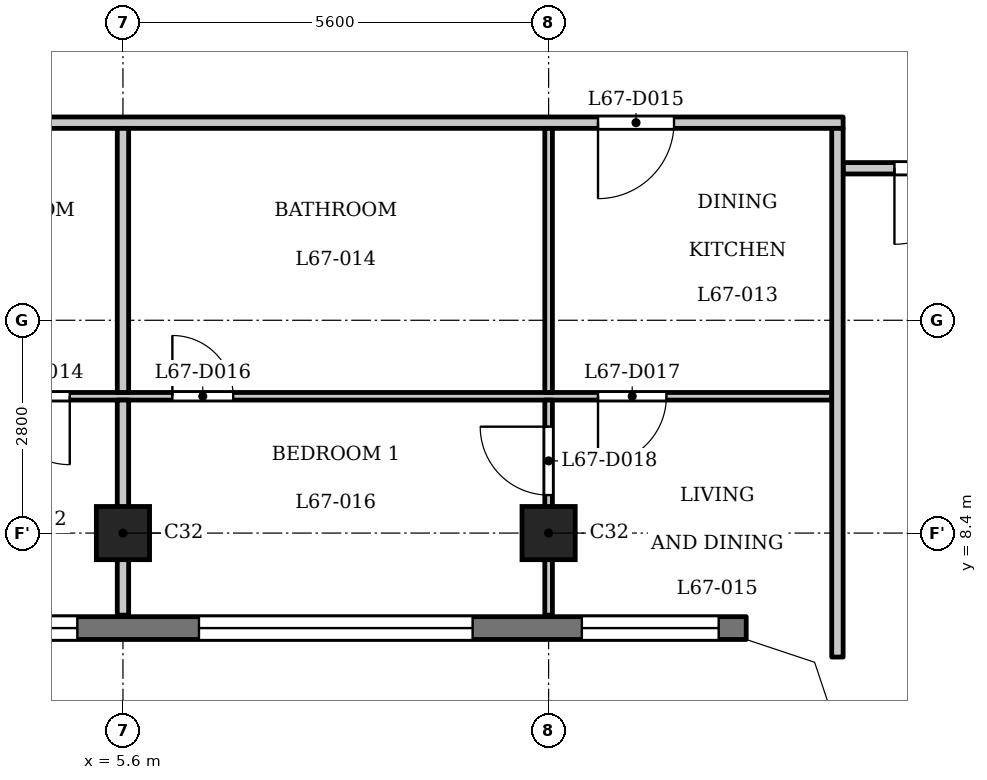
"""IFC4 building model, lengths in metres.
Left out: names, types, materials, properties, quantities, classifications, styles, units other than length and angle.
Written with IfcOpenShell. Run it as: python <this file> out.ifc"""

import sys

from ifc_helpers import new_model, si_unit, direction, frame, frame_2d, origin, origin_2d, place, context, subcontext, project, spatial, polyline, rectangle, outline, extrude, element, fill, save


model = new_model("IFC4")
c1 = context("Model", 3, precision=1e-05, world=origin(), true_north=direction((0.0, 1.0)))
c2 = subcontext(c1, "Body", "Model", "MODEL_VIEW")
j1 = project(units=[si_unit("LENGTHUNIT", "METRE"), si_unit("PLANEANGLEUNIT", "RADIAN")], contexts=[c1])
p1 = place(None, origin())
s1 = spatial("IfcSite", under=j1, at=p1, CompositionType="ELEMENT")
p2 = place(p1, origin())
s2 = spatial("IfcBuilding", under=s1, at=p2, CompositionType="ELEMENT")
p3 = place(p2, frame((0.0, 0.0, 259.2)))
s3 = spatial("IfcBuildingStorey", under=s2, at=p3, CompositionType="ELEMENT", Elevation=259.2)
for number, where, z_axis, x_axis in (
    (1, (5.6, 8.4, 0.0), (0.0, 0.0, 1.0), (1.0, 0.0, 0.0)),
    (2, (11.2, 8.4, 0.0), (0.0, 0.0, 1.0), (1.0, 0.0, 0.0)),
):
    element("IfcColumn", number, at=place(p3, frame(where, z_axis=z_axis, x_axis=x_axis)), inside=s3, PredefinedType="COLUMN", context=c2, shape_type="SweptSolid", body=[
        extrude(rectangle(XDim=0.7, YDim=0.7, at=origin_2d()), origin(), (0.0, 0.0, 1.0), 3.5),
    ])
p4 = place(p3, frame((-13.8, 7.15, 0.0), z_axis=(0.0, 0.0, 1.0), x_axis=(1.0, 0.0, 0.0)))
e3 = element("IfcWall", 3, at=p4, inside=s3, PredefinedType="SOLIDWALL", context=c2, shape_type="SweptSolid", body=[
    extrude(rectangle(XDim=27.6, YDim=0.3, at=frame_2d((13.8, 0.0))), origin(), (0.0, 0.0, 1.0), 3.2),
])
p5 = place(p4, frame((0.363, 0.0, 0.9)))
e4 = element("IfcOpeningElement", 4, at=p5, cuts=e3, PredefinedType="OPENING", context=c2, shape_type="SweptSolid", body=[
    extrude(rectangle(XDim=1.8, YDim=1.25, at=frame_2d((0.9, 0.625))), frame((0.0, 0.16, 0.0), z_axis=(0.0, -1.0, 0.0), x_axis=(1.0, 0.0, 0.0)), (0.0, 0.0, 1.0), 0.32),
])
p6 = place(p4, frame((3.6, 0.0, 1.2)))
e5 = element("IfcOpeningElement", 5, at=p6, cuts=e3, PredefinedType="OPENING", context=c2, shape_type="SweptSolid", body=[
    extrude(rectangle(XDim=3.6, YDim=0.95, at=frame_2d((1.8, 0.475))), frame((0.0, 0.16, 0.0), z_axis=(0.0, -1.0, 0.0), x_axis=(1.0, 0.0, 0.0)), (0.0, 0.0, 1.0), 0.32),
])
p7 = place(p4, frame((9.2, 0.0, 1.2)))
e6 = element("IfcOpeningElement", 6, at=p7, cuts=e3, PredefinedType="OPENING", context=c2, shape_type="SweptSolid", body=[
    extrude(rectangle(XDim=3.6, YDim=0.95, at=frame_2d((1.8, 0.475))), frame((0.0, 0.16, 0.0), z_axis=(0.0, -1.0, 0.0), x_axis=(1.0, 0.0, 0.0)), (0.0, 0.0, 1.0), 0.32),
])
p8 = place(p4, frame((14.2, 0.0, 0.9)))
e7 = element("IfcOpeningElement", 7, at=p8, cuts=e3, PredefinedType="OPENING", context=c2, shape_type="SweptSolid", body=[
    extrude(rectangle(XDim=1.8, YDim=1.25, at=frame_2d((0.9, 0.625))), frame((0.0, 0.16, 0.0), z_axis=(0.0, -1.0, 0.0), x_axis=(1.0, 0.0, 0.0)), (0.0, 0.0, 1.0), 0.32),
])
p9 = place(p4, frame((17.0, 0.0, 0.9)))
e8 = element("IfcOpeningElement", 8, at=p9, cuts=e3, PredefinedType="OPENING", context=c2, shape_type="SweptSolid", body=[
    extrude(rectangle(XDim=1.8, YDim=1.25, at=frame_2d((0.9, 0.625))), frame((0.0, 0.16, 0.0), z_axis=(0.0, -1.0, 0.0), x_axis=(1.0, 0.0, 0.0)), (0.0, 0.0, 1.0), 0.32),
])
p10 = place(p4, frame((20.4, 0.0, 1.2)))
e9 = element("IfcOpeningElement", 9, at=p10, cuts=e3, PredefinedType="OPENING", context=c2, shape_type="SweptSolid", body=[
    extrude(rectangle(XDim=3.6, YDim=0.95, at=frame_2d((1.8, 0.475))), frame((0.0, 0.16, 0.0), z_axis=(0.0, -1.0, 0.0), x_axis=(1.0, 0.0, 0.0)), (0.0, 0.0, 1.0), 0.32),
])
p11 = place(p4, frame((25.438, 0.0, 0.9)))
e10 = element("IfcOpeningElement", 10, at=p11, cuts=e3, PredefinedType="OPENING", context=c2, shape_type="SweptSolid", body=[
    extrude(rectangle(XDim=1.8, YDim=1.25, at=frame_2d((0.9, 0.625))), frame((0.0, 0.16, 0.0), z_axis=(0.0, -1.0, 0.0), x_axis=(1.0, 0.0, 0.0)), (0.0, 0.0, 1.0), 0.32),
])
p12 = place(p3, frame((-14.925, 10.2, 0.0), z_axis=(0.0, 0.0, 1.0), x_axis=(1.0, 0.0, 0.0)))
e11 = element("IfcWall", 11, at=p12, inside=s3, PredefinedType="PARTITIONING", context=c2, shape_type="SweptSolid", body=[
    extrude(rectangle(XDim=29.85, YDim=0.1, at=frame_2d((14.925, 0.0))), origin(), (0.0, 0.0, 1.0), 3.2),
])
p13 = place(p12, frame((4.375, 0.0, 0.0)))
e12 = element("IfcOpeningElement", 12, at=p13, cuts=e11, PredefinedType="OPENING", context=c2, shape_type="SweptSolid", body=[
    extrude(rectangle(XDim=0.8, YDim=2.1, at=frame_2d((0.4, 1.05))), frame((0.0, 0.06, 0.0), z_axis=(0.0, -1.0, 0.0), x_axis=(1.0, 0.0, 0.0)), (0.0, 0.0, 1.0), 0.12),
])
p14 = place(p12, frame((0.576, 0.0, 0.0)))
e13 = element("IfcOpeningElement", 13, at=p14, cuts=e11, PredefinedType="OPENING", context=c2, shape_type="SweptSolid", body=[
    extrude(rectangle(XDim=0.9, YDim=2.1, at=frame_2d((0.45, 1.05))), frame((0.0, 0.06, 0.0), z_axis=(0.0, -1.0, 0.0), x_axis=(1.0, 0.0, 0.0)), (0.0, 0.0, 1.0), 0.12),
])
p15 = place(p12, frame((10.075, 0.0, 0.0)))
e14 = element("IfcOpeningElement", 14, at=p15, cuts=e11, PredefinedType="OPENING", context=c2, shape_type="SweptSolid", body=[
    extrude(rectangle(XDim=0.8, YDim=2.1, at=frame_2d((0.4, 1.05))), frame((0.0, 0.06, 0.0), z_axis=(0.0, -1.0, 0.0), x_axis=(1.0, 0.0, 0.0)), (0.0, 0.0, 1.0), 0.12),
])
p16 = place(p12, frame((12.675, 0.0, 0.0)))
e15 = element("IfcOpeningElement", 15, at=p16, cuts=e11, PredefinedType="OPENING", context=c2, shape_type="SweptSolid", body=[
    extrude(rectangle(XDim=0.9, YDim=2.1, at=frame_2d((0.45, 1.05))), frame((0.0, 0.06, 0.0), z_axis=(0.0, -1.0, 0.0), x_axis=(1.0, 0.0, 0.0)), (0.0, 0.0, 1.0), 0.12),
])
p17 = place(p12, frame((16.075, 0.0, 0.0)))
e16 = element("IfcOpeningElement", 16, at=p17, cuts=e11, PredefinedType="OPENING", context=c2, shape_type="SweptSolid", body=[
    extrude(rectangle(XDim=0.9, YDim=2.1, at=frame_2d((0.45, 1.05))), frame((0.0, 0.06, 0.0), z_axis=(0.0, -1.0, 0.0), x_axis=(1.0, 0.0, 0.0)), (0.0, 0.0, 1.0), 0.12),
])
p18 = place(p12, frame((18.925, 0.0, 0.0)))
e17 = element("IfcOpeningElement", 17, at=p18, cuts=e11, PredefinedType="OPENING", context=c2, shape_type="SweptSolid", body=[
    extrude(rectangle(XDim=0.9, YDim=2.1, at=frame_2d((0.45, 1.05))), frame((0.0, 0.06, 0.0), z_axis=(0.0, -1.0, 0.0), x_axis=(1.0, 0.0, 0.0)), (0.0, 0.0, 1.0), 0.12),
])
p19 = place(p12, frame((21.175, 0.0, 0.0)))
e18 = element("IfcOpeningElement", 18, at=p19, cuts=e11, PredefinedType="OPENING", context=c2, shape_type="SweptSolid", body=[
    extrude(rectangle(XDim=0.8, YDim=2.1, at=frame_2d((0.4, 1.05))), frame((0.0, 0.06, 0.0), z_axis=(0.0, -1.0, 0.0), x_axis=(1.0, 0.0, 0.0)), (0.0, 0.0, 1.0), 0.12),
])
p20 = place(p12, frame((26.775, 0.0, 0.0)))
e19 = element("IfcOpeningElement", 19, at=p20, cuts=e11, PredefinedType="OPENING", context=c2, shape_type="SweptSolid", body=[
    extrude(rectangle(XDim=0.9, YDim=2.1, at=frame_2d((0.45, 1.05))), frame((0.0, 0.06, 0.0), z_axis=(0.0, -1.0, 0.0), x_axis=(1.0, 0.0, 0.0)), (0.0, 0.0, 1.0), 0.12),
])
p21 = place(p3, frame((15.075, 13.2, 0.0), z_axis=(0.0, 0.0, 1.0), x_axis=(1.0, 0.0, 0.0)))
e20 = element("IfcWall", 20, at=p21, inside=s3, PredefinedType="PARTITIONING", context=c2, shape_type="SweptSolid", body=[
    extrude(rectangle(XDim=2.325, YDim=0.15, at=frame_2d((1.163, 0.0))), origin(), (0.0, 0.0, 1.0), 3.2),
])
p22 = place(p21, frame((0.675, 0.0, 0.0)))
e21 = element("IfcOpeningElement", 21, at=p22, cuts=e20, PredefinedType="OPENING", context=c2, shape_type="SweptSolid", body=[
    extrude(rectangle(XDim=1.0, YDim=2.1, at=frame_2d((0.5, 1.05))), frame((0.0, 0.085, 0.0), z_axis=(0.0, -1.0, 0.0), x_axis=(1.0, 0.0, 0.0)), (0.0, 0.0, 1.0), 0.17),
])
p23 = place(p3, frame((-15.075, 13.8, 0.0), z_axis=(0.0, 0.0, 1.0), x_axis=(1.0, 0.0, 0.0)))
e22 = element("IfcWall", 22, at=p23, inside=s3, PredefinedType="PARTITIONING", context=c2, shape_type="SweptSolid", body=[
    extrude(rectangle(XDim=30.15, YDim=0.15, at=frame_2d((15.075, 0.0))), origin(), (0.0, 0.0, 1.0), 3.2),
])
p24 = place(p23, frame((0.726, 0.0, 0.0)))
e23 = element("IfcOpeningElement", 23, at=p24, cuts=e22, PredefinedType="OPENING", context=c2, shape_type="SweptSolid", body=[
    extrude(rectangle(XDim=1.0, YDim=2.1, at=frame_2d((0.5, 1.05))), frame((0.0, 0.085, 0.0), z_axis=(0.0, -1.0, 0.0), x_axis=(1.0, 0.0, 0.0)), (0.0, 0.0, 1.0), 0.17),
])
p25 = place(p23, frame((15.725, 0.0, 0.0)))
e24 = element("IfcOpeningElement", 24, at=p25, cuts=e22, PredefinedType="OPENING", context=c2, shape_type="SweptSolid", body=[
    extrude(rectangle(XDim=1.0, YDim=2.1, at=frame_2d((0.5, 1.05))), frame((0.0, 0.085, 0.0), z_axis=(0.0, -1.0, 0.0), x_axis=(1.0, 0.0, 0.0)), (0.0, 0.0, 1.0), 0.17),
])
p26 = place(p23, frame((26.925, 0.0, 0.0)))
e25 = element("IfcOpeningElement", 25, at=p26, cuts=e22, PredefinedType="OPENING", context=c2, shape_type="SweptSolid", body=[
    extrude(rectangle(XDim=1.0, YDim=2.1, at=frame_2d((0.5, 1.05))), frame((0.0, 0.085, 0.0), z_axis=(0.0, -1.0, 0.0), x_axis=(1.0, 0.0, 0.0)), (0.0, 0.0, 1.0), 0.17),
])
p27 = place(p3, frame((5.6, 7.32, 0.0), z_axis=(0.0, 0.0, 1.0), x_axis=(0.0, 1.0, 0.0)))
e26 = element("IfcWall", 26, at=p27, inside=s3, PredefinedType="PARTITIONING", context=c2, shape_type="SweptSolid", body=[
    extrude(rectangle(XDim=2.83, YDim=0.15, at=frame_2d((1.415, 0.0))), origin(), (0.0, 0.0, 1.0), 3.2),
])
p28 = place(p3, frame((5.6, 10.25, 0.0), z_axis=(0.0, 0.0, 1.0), x_axis=(0.0, 1.0, 0.0)))
e27 = element("IfcWall", 27, at=p28, inside=s3, PredefinedType="PARTITIONING", context=c2, shape_type="SweptSolid", body=[
    extrude(rectangle(XDim=3.475, YDim=0.15, at=frame_2d((1.738, 0.0))), origin(), (0.0, 0.0, 1.0), 3.2),
])
p29 = place(p3, frame((11.2, 7.32, 0.0), z_axis=(0.0, 0.0, 1.0), x_axis=(0.0, 1.0, 0.0)))
e28 = element("IfcWall", 28, at=p29, inside=s3, PredefinedType="PARTITIONING", context=c2, shape_type="SweptSolid", body=[
    extrude(rectangle(XDim=2.83, YDim=0.1, at=frame_2d((1.415, 0.0))), origin(), (0.0, 0.0, 1.0), 3.2),
])
p30 = place(p29, frame((1.58, 0.0, 0.0)))
e29 = element("IfcOpeningElement", 29, at=p30, cuts=e28, PredefinedType="OPENING", context=c2, shape_type="SweptSolid", body=[
    extrude(rectangle(XDim=0.9, YDim=2.1, at=frame_2d((0.45, 1.05))), frame((0.0, 0.06, 0.0), z_axis=(0.0, -1.0, 0.0), x_axis=(1.0, 0.0, 0.0)), (0.0, 0.0, 1.0), 0.12),
])
p31 = place(p3, frame((11.2, 10.25, 0.0), z_axis=(0.0, 0.0, 1.0), x_axis=(0.0, 1.0, 0.0)))
e30 = element("IfcWall", 30, at=p31, inside=s3, PredefinedType="PARTITIONING", context=c2, shape_type="SweptSolid", body=[
    extrude(rectangle(XDim=3.475, YDim=0.1, at=frame_2d((1.738, 0.0))), origin(), (0.0, 0.0, 1.0), 3.2),
])
p32 = place(p3, frame((15.0, 6.769, 0.0), z_axis=(0.0, 0.0, 1.0), x_axis=(0.0, 1.0, 0.0)))
e31 = element("IfcWall", 31, at=p32, inside=s3, PredefinedType="PARTITIONING", context=c2, shape_type="SweptSolid", body=[
    extrude(rectangle(XDim=6.956, YDim=0.15, at=frame_2d((3.478, 0.0))), origin(), (0.0, 0.0, 1.0), 3.2),
])
p33 = place(p3, origin())
e32 = element("IfcWall", 32, at=p33, inside=s3, PredefinedType="SOLIDWALL", context=c2, shape_type="SweptSolid", body=[
    extrude(outline(polyline([(14.937, 6.937), (13.849, 7.3), (13.8, 7.3), (13.8, 7.0), (14.7, 6.7), (15.0, 5.8), (15.3, 5.8), (15.3, 5.849), (14.937, 6.937)])), origin(), (0.0, 0.0, 1.0), 3.2),
])
p34 = place(p22, origin())
e33 = element("IfcDoor", 33, at=p34, inside=s3, OperationType="SINGLE_SWING_LEFT", PredefinedType="DOOR", context=c2, shape_type="SweptSolid", body=[
    extrude(rectangle(XDim=1.0, YDim=2.1, at=frame_2d((0.5, 1.05))), frame((0.0, 0.025, 0.0), z_axis=(0.0, -1.0, 0.0), x_axis=(1.0, 0.0, 0.0)), (0.0, 0.0, 1.0), 0.05),
])
fill(e21, e33)
p35 = place(p18, origin())
e34 = element("IfcDoor", 34, at=p35, inside=s3, OperationType="SINGLE_SWING_RIGHT", PredefinedType="DOOR", context=c2, shape_type="SweptSolid", body=[
    extrude(rectangle(XDim=0.9, YDim=2.1, at=frame_2d((0.45, 1.05))), frame((0.0, 0.025, 0.0), z_axis=(0.0, -1.0, 0.0), x_axis=(1.0, 0.0, 0.0)), (0.0, 0.0, 1.0), 0.05),
])
fill(e17, e34)
p36 = place(p26, origin())
e35 = element("IfcDoor", 35, at=p36, inside=s3, OperationType="SINGLE_SWING_LEFT", PredefinedType="DOOR", context=c2, shape_type="SweptSolid", body=[
    extrude(rectangle(XDim=1.0, YDim=2.1, at=frame_2d((0.5, 1.05))), frame((0.0, 0.025, 0.0), z_axis=(0.0, -1.0, 0.0), x_axis=(1.0, 0.0, 0.0)), (0.0, 0.0, 1.0), 0.05),
])
fill(e25, e35)
p37 = place(p19, origin())
e36 = element("IfcDoor", 36, at=p37, inside=s3, OperationType="SINGLE_SWING_RIGHT", PredefinedType="DOOR", context=c2, shape_type="SweptSolid", body=[
    extrude(rectangle(XDim=0.8, YDim=2.1, at=frame_2d((0.4, 1.05))), frame((0.0, 0.025, 0.0), z_axis=(0.0, -1.0, 0.0), x_axis=(1.0, 0.0, 0.0)), (0.0, 0.0, 1.0), 0.05),
])
fill(e18, e36)
p38 = place(p20, origin())
e37 = element("IfcDoor", 37, at=p38, inside=s3, OperationType="SINGLE_SWING_LEFT", PredefinedType="DOOR", context=c2, shape_type="SweptSolid", body=[
    extrude(rectangle(XDim=0.9, YDim=2.1, at=frame_2d((0.45, 1.05))), frame((0.0, 0.025, 0.0), z_axis=(0.0, -1.0, 0.0), x_axis=(1.0, 0.0, 0.0)), (0.0, 0.0, 1.0), 0.05),
])
fill(e19, e37)
p39 = place(p30, origin())
e38 = element("IfcDoor", 38, at=p39, inside=s3, OperationType="SINGLE_SWING_LEFT", PredefinedType="DOOR", context=c2, shape_type="SweptSolid", body=[
    extrude(rectangle(XDim=0.9, YDim=2.1, at=frame_2d((0.45, 1.05))), frame((0.0, 0.025, 0.0), z_axis=(0.0, -1.0, 0.0), x_axis=(1.0, 0.0, 0.0)), (0.0, 0.0, 1.0), 0.05),
])
fill(e29, e38)
p40 = place(p9, origin())
e39 = element("IfcWindow", 39, at=p40, inside=s3, PartitioningType="SINGLE_PANEL", PredefinedType="WINDOW", context=c2, shape_type="SweptSolid", body=[
    extrude(rectangle(XDim=1.8, YDim=1.25, at=frame_2d((0.9, 0.625))), frame((0.0, 0.03, 0.0), z_axis=(0.0, -1.0, 0.0), x_axis=(1.0, 0.0, 0.0)), (0.0, 0.0, 1.0), 0.06),
])
fill(e8, e39)
p41 = place(p10, origin())
e40 = element("IfcWindow", 40, at=p41, inside=s3, PartitioningType="SINGLE_PANEL", PredefinedType="WINDOW", context=c2, shape_type="SweptSolid", body=[
    extrude(rectangle(XDim=3.6, YDim=0.95, at=frame_2d((1.8, 0.475))), frame((0.0, 0.03, 0.0), z_axis=(0.0, -1.0, 0.0), x_axis=(1.0, 0.0, 0.0)), (0.0, 0.0, 1.0), 0.06),
])
fill(e9, e40)
p42 = place(p11, origin())
e41 = element("IfcWindow", 41, at=p42, inside=s3, PartitioningType="SINGLE_PANEL", PredefinedType="WINDOW", context=c2, shape_type="SweptSolid", body=[
    extrude(rectangle(XDim=1.8, YDim=1.25, at=frame_2d((0.9, 0.625))), frame((0.0, 0.03, 0.0), z_axis=(0.0, -1.0, 0.0), x_axis=(1.0, 0.0, 0.0)), (0.0, 0.0, 1.0), 0.06),
])
fill(e10, e41)
save(model, sys.argv[1])
